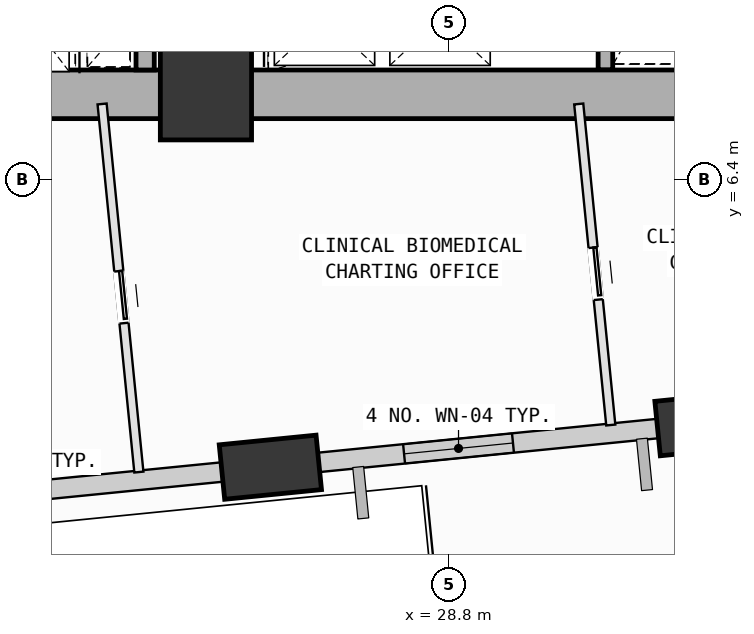
"""IFC4 building model, lengths in metres.
Left out: names, types, materials, properties, quantities, classifications, styles, units other than length and angle.
Written with IfcOpenShell. Run it as: python <this file> out.ifc"""

import sys

from ifc_helpers import new_model, si_unit, direction, frame, frame_2d, origin, origin_2d, place, context, subcontext, project, spatial, rectangle, extrude, element, fill, save


model = new_model("IFC4")
c1 = context("Model", 3, precision=1e-05, world=origin(), true_north=direction((0.0, 1.0)))
c2 = subcontext(c1, "Body", "Model", "MODEL_VIEW")
j1 = project(units=[si_unit("LENGTHUNIT", "METRE"), si_unit("PLANEANGLEUNIT", "RADIAN")], contexts=[c1])
p1 = place(None, origin())
s1 = spatial("IfcSite", under=j1, at=p1, CompositionType="ELEMENT")
p2 = place(p1, origin())
s2 = spatial("IfcBuilding", under=s1, at=p2, CompositionType="ELEMENT")
p3 = place(p2, frame((0.0, 0.0, 47.0)))
s3 = spatial("IfcBuildingStorey", under=s2, at=p3, CompositionType="ELEMENT", Elevation=47.0)
p4 = place(p3, frame((24.8, 7.8, 0.0), z_axis=(0.0, 0.0, 1.0), x_axis=(1.0, 0.0, 0.0)))
e1 = element("IfcColumn", 1, at=p4, inside=s3, PredefinedType="COLUMN", context=c2, shape_type="SweptSolid", body=[
    extrude(rectangle(XDim=1.5, YDim=1.5, at=origin_2d()), origin(), (0.0, 0.0, 1.0), 4.0),
])
p5 = place(p3, frame((25.859, 1.667, 0.002), z_axis=(0.095663738453, -0.031118064859, 0.994927190896), x_axis=(0.213833086503, 0.976819115495, 0.009991332253)))
e2 = element("IfcColumn", 2, at=p5, inside=s3, PredefinedType="COLUMN", context=c2, shape_type="SweptSolid", body=[
    extrude(rectangle(XDim=1.6, YDim=0.9, at=origin_2d()), origin(), (0.0, 0.0, 1.0), 4.017),
])
p6 = place(p3, frame((25.444, 1.625, 0.0), z_axis=(0.0, 0.0, 1.0), x_axis=(-0.99505247285, -0.099350773905, 0.0)))
e3 = element("IfcWall", 3, at=p6, inside=s3, PredefinedType="SOLIDWALL", context=c2, shape_type="SweptSolid", body=[
    extrude(rectangle(XDim=6.006, YDim=0.32, at=frame_2d((3.003, 0.0))), origin(), (0.0, 0.0, 1.0), 3.165),
])
p7 = place(p6, frame((3.276, 0.0, 0.75)))
e4 = element("IfcOpeningElement", 4, at=p7, cuts=e3, PredefinedType="OPENING", context=c2, shape_type="SweptSolid", body=[
    extrude(rectangle(XDim=1.4, YDim=1.85, at=frame_2d((0.7, 0.925))), frame((0.0, 0.17, 0.0), z_axis=(0.0, -1.0, 0.0), x_axis=(1.0, 0.0, 0.0)), (0.0, 0.0, 1.0), 0.34),
])
p8 = place(p3, frame((32.603, 2.34, 0.0), z_axis=(0.0, 0.0, 1.0), x_axis=(-0.995058153954, -0.099293858063, 0.0)))
e5 = element("IfcWall", 5, at=p8, inside=s3, PredefinedType="SOLIDWALL", context=c2, shape_type="SweptSolid", body=[
    extrude(rectangle(XDim=5.99, YDim=0.32, at=frame_2d((2.995, 0.0))), origin(), (0.0, 0.0, 1.0), 3.165),
])
p9 = place(p8, frame((2.767, 0.0, 0.75)))
e6 = element("IfcOpeningElement", 6, at=p9, cuts=e5, PredefinedType="OPENING", context=c2, shape_type="SweptSolid", body=[
    extrude(rectangle(XDim=1.8, YDim=2.05, at=frame_2d((0.9, 1.025))), frame((0.0, 0.17, 0.0), z_axis=(0.0, -1.0, 0.0), x_axis=(1.0, 0.0, 0.0)), (0.0, 0.0, 1.0), 0.34),
])
p10 = place(p3, frame((31.37, 8.2, 0.0), z_axis=(0.0, 0.0, 1.0), x_axis=(0.0, 1.0, 0.0)))
e7 = element("IfcWall", 7, at=p10, inside=s3, PredefinedType="SOLIDWALL", context=c2, shape_type="SweptSolid", body=[
    extrude(rectangle(XDim=6.92, YDim=0.24, at=frame_2d((3.46, 0.0))), origin(), (0.0, 0.0, 1.0), 3.78),
])
for number, where, z_axis, x_axis in (
    (8, (14.0, 7.8, 0.0), (0.0, 0.0, 1.0), (1.0, 0.0, 0.0)),
    (9, (24.8, 7.8, 0.0), (0.0, 0.0, 1.0), (1.0, 0.0, 0.0)),
):
    element("IfcWall", number, at=place(p3, frame(where, z_axis=z_axis, x_axis=x_axis)), inside=s3, PredefinedType="SHEAR", context=c2, shape_type="SweptSolid", body=[
        extrude(rectangle(XDim=10.8, YDim=0.8, at=frame_2d((5.4, 0.0))), origin(), (0.0, 0.0, 1.0), 3.78),
    ])
p11 = place(p3, frame((23.8, 8.2, 0.0), z_axis=(0.0, 0.0, 1.0), x_axis=(0.0, 1.0, 0.0)))
e10 = element("IfcWall", 10, at=p11, inside=s3, PredefinedType="SOLIDWALL", context=c2, shape_type="SweptSolid", body=[
    extrude(rectangle(XDim=2.48, YDim=0.3, at=frame_2d((1.24, 0.0))), origin(), (0.0, 0.0, 1.0), 3.78),
])
p12 = place(p3, frame((23.092, 7.641, 0.0), z_axis=(0.0, 0.0, 1.0), x_axis=(0.099432207096, -0.995044338807, 0.0)))
e11 = element("IfcWall", 11, at=p12, inside=s3, PredefinedType="PARTITIONING", context=c2, shape_type="SweptSolid", body=[
    extrude(rectangle(XDim=6.084, YDim=0.15, at=frame_2d((3.042, 0.0))), origin(), (0.0, 0.0, 1.0), 3.78),
])
p13 = place(p12, frame((2.763, 0.0, 0.0)))
e12 = element("IfcOpeningElement", 12, at=p13, cuts=e11, PredefinedType="OPENING", context=c2, shape_type="SweptSolid", body=[
    extrude(rectangle(XDim=0.86, YDim=2.06, at=frame_2d((0.43, 1.03))), frame((0.0, 0.085, 0.0), z_axis=(0.0, -1.0, 0.0), x_axis=(1.0, 0.0, 0.0)), (0.0, 0.0, 1.0), 0.17),
])
p14 = place(p3, frame((26.666, 1.516, 0.0), z_axis=(0.0, 0.0, 1.0), x_axis=(-0.995019119449, -0.099684261203, 0.0)))
e13 = element("IfcWall", 13, at=p14, inside=s3, PredefinedType="PARTITIONING", context=c2, shape_type="SweptSolid", body=[
    extrude(rectangle(XDim=1.205, YDim=0.15, at=frame_2d((0.603, 0.0))), origin(), (0.0, 0.0, 1.0), 3.165),
])
p15 = place(p3, frame((30.931, 7.641, 0.0), z_axis=(0.0, 0.0, 1.0), x_axis=(0.099335166826, -0.995054031011, 0.0)))
e14 = element("IfcWall", 14, at=p15, inside=s3, PredefinedType="PARTITIONING", context=c2, shape_type="SweptSolid", body=[
    extrude(rectangle(XDim=5.306, YDim=0.15, at=frame_2d((2.653, 0.0))), origin(), (0.0, 0.0, 1.0), 3.78),
])
p16 = place(p15, frame((2.374, 0.0, 0.0)))
e15 = element("IfcOpeningElement", 15, at=p16, cuts=e14, PredefinedType="OPENING", context=c2, shape_type="SweptSolid", body=[
    extrude(rectangle(XDim=0.86, YDim=2.06, at=frame_2d((0.43, 1.03))), frame((0.0, 0.085, 0.0), z_axis=(0.0, -1.0, 0.0), x_axis=(1.0, 0.0, 0.0)), (0.0, 0.0, 1.0), 0.17),
])
p17 = place(p9, origin())
e16 = element("IfcWindow", 16, at=p17, inside=s3, PartitioningType="SINGLE_PANEL", PredefinedType="WINDOW", context=c2, shape_type="SweptSolid", body=[
    extrude(rectangle(XDim=1.8, YDim=2.05, at=frame_2d((0.9, 1.025))), frame((0.0, 0.03, 0.0), z_axis=(0.0, -1.0, 0.0), x_axis=(1.0, 0.0, 0.0)), (0.0, 0.0, 1.0), 0.06),
])
fill(e6, e16)
p18 = place(p16, origin())
e17 = element("IfcDoor", 17, at=p18, inside=s3, OperationType="SLIDING_TO_LEFT", PredefinedType="DOOR", context=c2, shape_type="SweptSolid", body=[
    extrude(rectangle(XDim=0.86, YDim=2.06, at=frame_2d((0.43, 1.03))), frame((0.0, 0.025, 0.0), z_axis=(0.0, -1.0, 0.0), x_axis=(1.0, 0.0, 0.0)), (0.0, 0.0, 1.0), 0.05),
])
fill(e15, e17)
p19 = place(p13, origin())
e18 = element("IfcDoor", 18, at=p19, inside=s3, OperationType="SLIDING_TO_LEFT", PredefinedType="DOOR", context=c2, shape_type="SweptSolid", body=[
    extrude(rectangle(XDim=0.86, YDim=2.06, at=frame_2d((0.43, 1.03))), frame((0.0, 0.025, 0.0), z_axis=(0.0, -1.0, 0.0), x_axis=(1.0, 0.0, 0.0)), (0.0, 0.0, 1.0), 0.05),
])
fill(e12, e18)
save(model, sys.argv[1])
